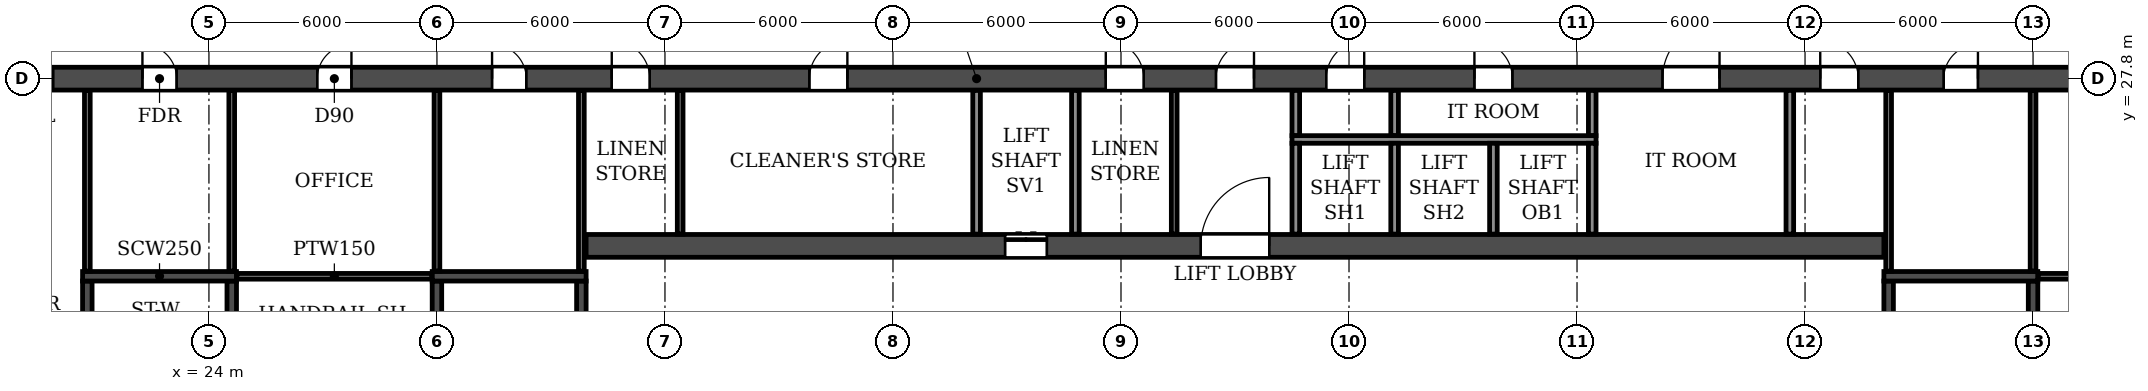
"""IFC4 building model, lengths in metres.
Left out: names, types, materials, properties, quantities, classifications, styles, units other than length and angle.
Written with IfcOpenShell. Run it as: python <this file> out.ifc"""

import sys

from ifc_helpers import new_model, si_unit, direction, frame, frame_2d, origin, place, context, subcontext, project, spatial, rectangle, extrude, element, fill, save


model = new_model("IFC4")
c1 = context("Model", 3, precision=1e-05, world=origin(), true_north=direction((0.0, 1.0)))
c2 = subcontext(c1, "Body", "Model", "MODEL_VIEW")
j1 = project(units=[si_unit("LENGTHUNIT", "METRE"), si_unit("PLANEANGLEUNIT", "RADIAN")], contexts=[c1])
p1 = place(None, origin())
s1 = spatial("IfcSite", under=j1, at=p1, CompositionType="ELEMENT")
p2 = place(p1, origin())
s2 = spatial("IfcBuilding", under=s1, at=p2, CompositionType="ELEMENT")
p3 = place(p2, frame((0.0, 0.0, 53.1)))
s3 = spatial("IfcBuildingStorey", under=s2, at=p3, CompositionType="ELEMENT", Elevation=53.1)
p4 = place(p3, frame((8.6, 27.8, 0.0), z_axis=(0.0, 0.0, 1.0), x_axis=(1.0, 0.0, 0.0)))
e1 = element("IfcWall", 1, at=p4, inside=s3, PredefinedType="SOLIDWALL", context=c2, shape_type="SweptSolid", body=[
    extrude(rectangle(XDim=84.8, YDim=0.6, at=frame_2d((42.4, 0.0))), origin(), (0.0, 0.0, 1.0), 3.05),
])
p5 = place(p4, frame((6.6, 0.0, 0.0)))
e2 = element("IfcOpeningElement", 2, at=p5, cuts=e1, PredefinedType="OPENING", context=c2, shape_type="SweptSolid", body=[
    extrude(rectangle(XDim=0.9, YDim=2.1, at=frame_2d((0.45, 1.05))), frame((0.0, 0.31, 0.0), z_axis=(0.0, -1.0, 0.0), x_axis=(1.0, 0.0, 0.0)), (0.0, 0.0, 1.0), 0.62),
])
p6 = place(p4, frame((10.3, 0.0, 0.0)))
e3 = element("IfcOpeningElement", 3, at=p6, cuts=e1, PredefinedType="OPENING", context=c2, shape_type="SweptSolid", body=[
    extrude(rectangle(XDim=1.0, YDim=2.1, at=frame_2d((0.5, 1.05))), frame((0.0, 0.31, 0.0), z_axis=(0.0, -1.0, 0.0), x_axis=(1.0, 0.0, 0.0)), (0.0, 0.0, 1.0), 0.62),
])
p7 = place(p4, frame((13.65, 0.0, 0.0)))
e4 = element("IfcOpeningElement", 4, at=p7, cuts=e1, PredefinedType="OPENING", context=c2, shape_type="SweptSolid", body=[
    extrude(rectangle(XDim=0.9, YDim=2.1, at=frame_2d((0.45, 1.05))), frame((0.0, 0.31, 0.0), z_axis=(0.0, -1.0, 0.0), x_axis=(1.0, 0.0, 0.0)), (0.0, 0.0, 1.0), 0.62),
])
p8 = place(p4, frame((18.25, 0.0, 0.0)))
e5 = element("IfcOpeningElement", 5, at=p8, cuts=e1, PredefinedType="OPENING", context=c2, shape_type="SweptSolid", body=[
    extrude(rectangle(XDim=0.9, YDim=2.1, at=frame_2d((0.45, 1.05))), frame((0.0, 0.31, 0.0), z_axis=(0.0, -1.0, 0.0), x_axis=(1.0, 0.0, 0.0)), (0.0, 0.0, 1.0), 0.62),
])
p9 = place(p4, frame((22.85, 0.0, 0.0)))
e6 = element("IfcOpeningElement", 6, at=p9, cuts=e1, PredefinedType="OPENING", context=c2, shape_type="SweptSolid", body=[
    extrude(rectangle(XDim=0.9, YDim=2.1, at=frame_2d((0.45, 1.05))), frame((0.0, 0.31, 0.0), z_axis=(0.0, -1.0, 0.0), x_axis=(1.0, 0.0, 0.0)), (0.0, 0.0, 1.0), 0.62),
])
p10 = place(p4, frame((26.0, 0.0, 0.0)))
e7 = element("IfcOpeningElement", 7, at=p10, cuts=e1, PredefinedType="OPENING", context=c2, shape_type="SweptSolid", body=[
    extrude(rectangle(XDim=1.0, YDim=2.1, at=frame_2d((0.5, 1.05))), frame((0.0, 0.31, 0.0), z_axis=(0.0, -1.0, 0.0), x_axis=(1.0, 0.0, 0.0)), (0.0, 0.0, 1.0), 0.62),
])
p11 = place(p4, frame((31.2, 0.0, 0.0)))
e8 = element("IfcOpeningElement", 8, at=p11, cuts=e1, PredefinedType="OPENING", context=c2, shape_type="SweptSolid", body=[
    extrude(rectangle(XDim=1.0, YDim=2.1, at=frame_2d((0.5, 1.05))), frame((0.0, 0.31, 0.0), z_axis=(0.0, -1.0, 0.0), x_axis=(1.0, 0.0, 0.0)), (0.0, 0.0, 1.0), 0.62),
])
p12 = place(p4, frame((39.0, 0.0, 0.0)))
e9 = element("IfcOpeningElement", 9, at=p12, cuts=e1, PredefinedType="OPENING", context=c2, shape_type="SweptSolid", body=[
    extrude(rectangle(XDim=1.0, YDim=2.1, at=frame_2d((0.5, 1.05))), frame((0.0, 0.31, 0.0), z_axis=(0.0, -1.0, 0.0), x_axis=(1.0, 0.0, 0.0)), (0.0, 0.0, 1.0), 0.62),
])
p13 = place(p4, frame((41.9, 0.0, 0.0)))
e10 = element("IfcOpeningElement", 10, at=p13, cuts=e1, PredefinedType="OPENING", context=c2, shape_type="SweptSolid", body=[
    extrude(rectangle(XDim=1.0, YDim=2.1, at=frame_2d((0.5, 1.05))), frame((0.0, 0.31, 0.0), z_axis=(0.0, -1.0, 0.0), x_axis=(1.0, 0.0, 0.0)), (0.0, 0.0, 1.0), 0.62),
])
p14 = place(p4, frame((44.8, 0.0, 0.0)))
e11 = element("IfcOpeningElement", 11, at=p14, cuts=e1, PredefinedType="OPENING", context=c2, shape_type="SweptSolid", body=[
    extrude(rectangle(XDim=1.0, YDim=2.1, at=frame_2d((0.5, 1.05))), frame((0.0, 0.31, 0.0), z_axis=(0.0, -1.0, 0.0), x_axis=(1.0, 0.0, 0.0)), (0.0, 0.0, 1.0), 0.62),
])
p15 = place(p4, frame((48.7, 0.0, 0.0)))
e12 = element("IfcOpeningElement", 12, at=p15, cuts=e1, PredefinedType="OPENING", context=c2, shape_type="SweptSolid", body=[
    extrude(rectangle(XDim=1.0, YDim=2.1, at=frame_2d((0.5, 1.05))), frame((0.0, 0.31, 0.0), z_axis=(0.0, -1.0, 0.0), x_axis=(1.0, 0.0, 0.0)), (0.0, 0.0, 1.0), 0.62),
])
p16 = place(p4, frame((53.65, 0.0, 0.0)))
e13 = element("IfcOpeningElement", 13, at=p16, cuts=e1, PredefinedType="OPENING", context=c2, shape_type="SweptSolid", body=[
    extrude(rectangle(XDim=1.5, YDim=2.1, at=frame_2d((0.75, 1.05))), frame((0.0, 0.31, 0.0), z_axis=(0.0, -1.0, 0.0), x_axis=(1.0, 0.0, 0.0)), (0.0, 0.0, 1.0), 0.62),
])
p17 = place(p4, frame((57.8, 0.0, 0.0)))
e14 = element("IfcOpeningElement", 14, at=p17, cuts=e1, PredefinedType="OPENING", context=c2, shape_type="SweptSolid", body=[
    extrude(rectangle(XDim=1.0, YDim=2.1, at=frame_2d((0.5, 1.05))), frame((0.0, 0.31, 0.0), z_axis=(0.0, -1.0, 0.0), x_axis=(1.0, 0.0, 0.0)), (0.0, 0.0, 1.0), 0.62),
])
p18 = place(p4, frame((61.05, 0.0, 0.0)))
e15 = element("IfcOpeningElement", 15, at=p18, cuts=e1, PredefinedType="OPENING", context=c2, shape_type="SweptSolid", body=[
    extrude(rectangle(XDim=0.9, YDim=2.1, at=frame_2d((0.45, 1.05))), frame((0.0, 0.31, 0.0), z_axis=(0.0, -1.0, 0.0), x_axis=(1.0, 0.0, 0.0)), (0.0, 0.0, 1.0), 0.62),
])
p19 = place(p4, frame((65.65, 0.0, 0.0)))
e16 = element("IfcOpeningElement", 16, at=p19, cuts=e1, PredefinedType="OPENING", context=c2, shape_type="SweptSolid", body=[
    extrude(rectangle(XDim=0.9, YDim=2.1, at=frame_2d((0.45, 1.05))), frame((0.0, 0.31, 0.0), z_axis=(0.0, -1.0, 0.0), x_axis=(1.0, 0.0, 0.0)), (0.0, 0.0, 1.0), 0.62),
])
p20 = place(p4, frame((70.25, 0.0, 0.0)))
e17 = element("IfcOpeningElement", 17, at=p20, cuts=e1, PredefinedType="OPENING", context=c2, shape_type="SweptSolid", body=[
    extrude(rectangle(XDim=0.9, YDim=2.1, at=frame_2d((0.45, 1.05))), frame((0.0, 0.31, 0.0), z_axis=(0.0, -1.0, 0.0), x_axis=(1.0, 0.0, 0.0)), (0.0, 0.0, 1.0), 0.62),
])
p21 = place(p4, frame((73.5, 0.0, 0.0)))
e18 = element("IfcOpeningElement", 18, at=p21, cuts=e1, PredefinedType="OPENING", context=c2, shape_type="SweptSolid", body=[
    extrude(rectangle(XDim=1.0, YDim=2.1, at=frame_2d((0.5, 1.05))), frame((0.0, 0.31, 0.0), z_axis=(0.0, -1.0, 0.0), x_axis=(1.0, 0.0, 0.0)), (0.0, 0.0, 1.0), 0.62),
])
p22 = place(p4, frame((77.3, 0.0, 0.0)))
e19 = element("IfcOpeningElement", 19, at=p22, cuts=e1, PredefinedType="OPENING", context=c2, shape_type="SweptSolid", body=[
    extrude(rectangle(XDim=0.9, YDim=2.1, at=frame_2d((0.45, 1.05))), frame((0.0, 0.31, 0.0), z_axis=(0.0, -1.0, 0.0), x_axis=(1.0, 0.0, 0.0)), (0.0, 0.0, 1.0), 0.62),
])
p23 = place(p3, frame((33.925, 23.4, 0.0), z_axis=(0.0, 0.0, 1.0), x_axis=(1.0, 0.0, 0.0)))
e20 = element("IfcWall", 20, at=p23, inside=s3, PredefinedType="SOLIDWALL", context=c2, shape_type="SweptSolid", body=[
    extrude(rectangle(XDim=34.15, YDim=0.6, at=frame_2d((17.075, 0.0))), origin(), (0.0, 0.0, 1.0), 3.05),
])
p24 = place(p23, frame((16.175, 0.0, 0.0)))
e21 = element("IfcOpeningElement", 21, at=p24, cuts=e20, PredefinedType="OPENING", context=c2, shape_type="SweptSolid", body=[
    extrude(rectangle(XDim=1.8, YDim=2.1, at=frame_2d((0.9, 1.05))), frame((0.0, 0.31, 0.0), z_axis=(0.0, -1.0, 0.0), x_axis=(1.0, 0.0, 0.0)), (0.0, 0.0, 1.0), 0.62),
])
p25 = place(p23, frame((11.025, 0.0, 0.0)))
e22 = element("IfcOpeningElement", 22, at=p25, cuts=e20, PredefinedType="OPENING", context=c2, shape_type="SweptSolid", body=[
    extrude(rectangle(XDim=1.1, YDim=2.1, at=frame_2d((0.55, 1.05))), frame((0.0, 0.31, 0.0), z_axis=(0.0, -1.0, 0.0), x_axis=(1.0, 0.0, 0.0)), (0.0, 0.0, 1.0), 0.62),
])
p26 = place(p3, frame((30.0, 14.9, 0.0), z_axis=(0.0, 0.0, 1.0), x_axis=(0.0, 1.0, 0.0)))
e23 = element("IfcWall", 23, at=p26, inside=s3, PredefinedType="SOLIDWALL", context=c2, shape_type="SweptSolid", body=[
    extrude(rectangle(XDim=7.575, YDim=0.25, at=frame_2d((3.788, 0.0))), origin(), (0.0, 0.0, 1.0), 3.05),
])
p27 = place(p3, frame((33.8, 14.9, 0.0), z_axis=(0.0, 0.0, 1.0), x_axis=(0.0, 1.0, 0.0)))
e24 = element("IfcWall", 24, at=p27, inside=s3, PredefinedType="SOLIDWALL", context=c2, shape_type="SweptSolid", body=[
    extrude(rectangle(XDim=7.575, YDim=0.25, at=frame_2d((3.788, 0.0))), origin(), (0.0, 0.0, 1.0), 3.05),
])
p28 = place(p27, frame((0.4, 0.0, 0.0)))
e25 = element("IfcOpeningElement", 25, at=p28, cuts=e24, PredefinedType="OPENING", context=c2, shape_type="SweptSolid", body=[
    extrude(rectangle(XDim=1.0, YDim=2.1, at=frame_2d((0.5, 1.05))), frame((0.0, 0.135, 0.0), z_axis=(0.0, -1.0, 0.0), x_axis=(1.0, 0.0, 0.0)), (0.0, 0.0, 1.0), 0.27),
])
p29 = place(p3, frame((29.875, 22.6, 0.0), z_axis=(0.0, 0.0, 1.0), x_axis=(1.0, 0.0, 0.0)))
e26 = element("IfcWall", 26, at=p29, inside=s3, PredefinedType="SOLIDWALL", context=c2, shape_type="SweptSolid", body=[
    extrude(rectangle(XDim=4.05, YDim=0.25, at=frame_2d((2.025, 0.0))), origin(), (0.0, 0.0, 1.0), 3.05),
])
p30 = place(p3, frame((68.2, 14.9, 0.0), z_axis=(0.0, 0.0, 1.0), x_axis=(0.0, 1.0, 0.0)))
e27 = element("IfcWall", 27, at=p30, inside=s3, PredefinedType="SOLIDWALL", context=c2, shape_type="SweptSolid", body=[
    extrude(rectangle(XDim=7.575, YDim=0.25, at=frame_2d((3.788, 0.0))), origin(), (0.0, 0.0, 1.0), 3.05),
])
p31 = place(p30, frame((0.4, 0.0, 0.0)))
e28 = element("IfcOpeningElement", 28, at=p31, cuts=e27, PredefinedType="OPENING", context=c2, shape_type="SweptSolid", body=[
    extrude(rectangle(XDim=1.0, YDim=2.1, at=frame_2d((0.5, 1.05))), frame((0.0, 0.135, 0.0), z_axis=(0.0, -1.0, 0.0), x_axis=(1.0, 0.0, 0.0)), (0.0, 0.0, 1.0), 0.27),
])
p32 = place(p3, frame((72.0, 14.9, 0.0), z_axis=(0.0, 0.0, 1.0), x_axis=(0.0, 1.0, 0.0)))
e29 = element("IfcWall", 29, at=p32, inside=s3, PredefinedType="SOLIDWALL", context=c2, shape_type="SweptSolid", body=[
    extrude(rectangle(XDim=7.575, YDim=0.25, at=frame_2d((3.788, 0.0))), origin(), (0.0, 0.0, 1.0), 3.05),
])
p33 = place(p3, frame((68.075, 22.6, 0.0), z_axis=(0.0, 0.0, 1.0), x_axis=(1.0, 0.0, 0.0)))
e30 = element("IfcWall", 30, at=p33, inside=s3, PredefinedType="SOLIDWALL", context=c2, shape_type="SweptSolid", body=[
    extrude(rectangle(XDim=4.05, YDim=0.25, at=frame_2d((2.025, 0.0))), origin(), (0.0, 0.0, 1.0), 3.05),
])
p34 = place(p3, frame((20.8, 14.9, 0.0), z_axis=(0.0, 0.0, 1.0), x_axis=(0.0, 1.0, 0.0)))
e31 = element("IfcWall", 31, at=p34, inside=s3, PredefinedType="SOLIDWALL", context=c2, shape_type="SweptSolid", body=[
    extrude(rectangle(XDim=7.575, YDim=0.25, at=frame_2d((3.788, 0.0))), origin(), (0.0, 0.0, 1.0), 3.05),
])
p35 = place(p34, frame((0.4, 0.0, 0.0)))
e32 = element("IfcOpeningElement", 32, at=p35, cuts=e31, PredefinedType="OPENING", context=c2, shape_type="SweptSolid", body=[
    extrude(rectangle(XDim=1.0, YDim=2.1, at=frame_2d((0.5, 1.05))), frame((0.0, 0.135, 0.0), z_axis=(0.0, -1.0, 0.0), x_axis=(1.0, 0.0, 0.0)), (0.0, 0.0, 1.0), 0.27),
])
p36 = place(p3, frame((24.6, 14.9, 0.0), z_axis=(0.0, 0.0, 1.0), x_axis=(0.0, 1.0, 0.0)))
e33 = element("IfcWall", 33, at=p36, inside=s3, PredefinedType="SOLIDWALL", context=c2, shape_type="SweptSolid", body=[
    extrude(rectangle(XDim=7.575, YDim=0.25, at=frame_2d((3.788, 0.0))), origin(), (0.0, 0.0, 1.0), 3.05),
])
p37 = place(p3, frame((20.675, 22.6, 0.0), z_axis=(0.0, 0.0, 1.0), x_axis=(1.0, 0.0, 0.0)))
e34 = element("IfcWall", 34, at=p37, inside=s3, PredefinedType="SOLIDWALL", context=c2, shape_type="SweptSolid", body=[
    extrude(rectangle(XDim=4.05, YDim=0.25, at=frame_2d((2.025, 0.0))), origin(), (0.0, 0.0, 1.0), 3.05),
])
p38 = place(p3, frame((49.4, 23.71, 0.0), z_axis=(0.0, 0.0, 1.0), x_axis=(0.0, 1.0, 0.0)))
e35 = element("IfcWall", 35, at=p38, inside=s3, PredefinedType="PARTITIONING", context=c2, shape_type="SweptSolid", body=[
    extrude(rectangle(XDim=3.78, YDim=0.15, at=frame_2d((1.89, 0.0))), origin(), (0.0, 0.0, 1.0), 3.05),
])
for number, where, z_axis, x_axis in (
    (36, (24.735, 22.6, 0.0), (0.0, 0.0, 1.0), (1.0, 0.0, 0.0)),
    (37, (72.135, 22.6, 0.0), (0.0, 0.0, 1.0), (1.0, 0.0, 0.0)),
):
    element("IfcWall", number, at=place(p3, frame(where, z_axis=z_axis, x_axis=x_axis)), inside=s3, PredefinedType="PARTITIONING", context=c2, shape_type="SweptSolid", body=[
        extrude(rectangle(XDim=5.13, YDim=0.15, at=frame_2d((2.565, 0.0))), origin(), (0.0, 0.0, 1.0), 3.05),
    ])
p39 = place(p3, frame((36.4, 23.71, 0.0), z_axis=(0.0, 0.0, 1.0), x_axis=(0.0, 1.0, 0.0)))
e38 = element("IfcWall", 38, at=p39, inside=s3, PredefinedType="PARTITIONING", context=c2, shape_type="SweptSolid", body=[
    extrude(rectangle(XDim=3.78, YDim=0.15, at=frame_2d((1.89, 0.0))), origin(), (0.0, 0.0, 1.0), 3.05),
])
for number, where, z_axis, x_axis in (
    (39, (52.6, 26.3, 0.0), (0.0, 0.0, 1.0), (0.0, 1.0, 0.0)),
    (40, (55.2, 26.3, 0.0), (0.0, 0.0, 1.0), (0.0, 1.0, 0.0)),
    (41, (60.4, 26.3, 0.0), (0.0, 0.0, 1.0), (0.0, 1.0, 0.0)),
):
    element("IfcWall", number, at=place(p3, frame(where, z_axis=z_axis, x_axis=x_axis)), inside=s3, PredefinedType="PARTITIONING", context=c2, shape_type="SweptSolid", body=[
        extrude(rectangle(XDim=1.19, YDim=0.2, at=frame_2d((0.595, 0.0))), origin(), (0.0, 0.0, 1.0), 3.05),
    ])
p40 = place(p3, frame((65.6, 23.71, 0.0), z_axis=(0.0, 0.0, 1.0), x_axis=(0.0, 1.0, 0.0)))
e42 = element("IfcWall", 42, at=p40, inside=s3, PredefinedType="PARTITIONING", context=c2, shape_type="SweptSolid", body=[
    extrude(rectangle(XDim=3.78, YDim=0.2, at=frame_2d((1.89, 0.0))), origin(), (0.0, 0.0, 1.0), 3.05),
])
for number, where, z_axis, x_axis in (
    (43, (20.8, 22.735, 0.0), (0.0, 0.0, 1.0), (0.0, 1.0, 0.0)),
    (44, (24.6, 22.735, 0.0), (0.0, 0.0, 1.0), (0.0, 1.0, 0.0)),
    (45, (30.0, 22.735, 0.0), (0.0, 0.0, 1.0), (0.0, 1.0, 0.0)),
    (46, (33.8, 22.735, 0.0), (0.0, 0.0, 1.0), (0.0, 1.0, 0.0)),
    (47, (68.2, 22.735, 0.0), (0.0, 0.0, 1.0), (0.0, 1.0, 0.0)),
    (48, (72.0, 22.735, 0.0), (0.0, 0.0, 1.0), (0.0, 1.0, 0.0)),
):
    element("IfcWall", number, at=place(p3, frame(where, z_axis=z_axis, x_axis=x_axis)), inside=s3, PredefinedType="PARTITIONING", context=c2, shape_type="SweptSolid", body=[
        extrude(rectangle(XDim=4.755, YDim=0.15, at=frame_2d((2.377, 0.0))), origin(), (0.0, 0.0, 1.0), 3.05),
    ])
p41 = place(p3, frame((52.5, 26.2, 0.0), z_axis=(0.0, 0.0, 1.0), x_axis=(1.0, 0.0, 0.0)))
e49 = element("IfcWall", 49, at=p41, inside=s3, PredefinedType="PARTITIONING", context=c2, shape_type="SweptSolid", body=[
    extrude(rectangle(XDim=8.0, YDim=0.2, at=frame_2d((4.0, 0.0))), origin(), (0.0, 0.0, 1.0), 3.05),
])
for number, where, z_axis, x_axis in (
    (50, (44.2, 23.71, 0.0), (0.0, 0.0, 1.0), (0.0, 1.0, 0.0)),
    (51, (46.8, 23.71, 0.0), (0.0, 0.0, 1.0), (0.0, 1.0, 0.0)),
):
    element("IfcWall", number, at=place(p3, frame(where, z_axis=z_axis, x_axis=x_axis)), inside=s3, PredefinedType="PARTITIONING", context=c2, shape_type="SweptSolid", body=[
        extrude(rectangle(XDim=3.78, YDim=0.2, at=frame_2d((1.89, 0.0))), origin(), (0.0, 0.0, 1.0), 3.05),
    ])
for number, where, z_axis, x_axis in (
    (52, (52.6, 23.71, 0.0), (0.0, 0.0, 1.0), (0.0, 1.0, 0.0)),
    (53, (55.2, 23.71, 0.0), (0.0, 0.0, 1.0), (0.0, 1.0, 0.0)),
    (54, (57.8, 23.71, 0.0), (0.0, 0.0, 1.0), (0.0, 1.0, 0.0)),
    (55, (60.4, 23.71, 0.0), (0.0, 0.0, 1.0), (0.0, 1.0, 0.0)),
):
    element("IfcWall", number, at=place(p3, frame(where, z_axis=z_axis, x_axis=x_axis)), inside=s3, PredefinedType="PARTITIONING", context=c2, shape_type="SweptSolid", body=[
        extrude(rectangle(XDim=2.39, YDim=0.2, at=frame_2d((1.195, 0.0))), origin(), (0.0, 0.0, 1.0), 3.05),
    ])
p42 = place(p6, origin())
e56 = element("IfcDoor", 56, at=p42, inside=s3, OperationType="SINGLE_SWING_LEFT", PredefinedType="DOOR", context=c2, shape_type="SweptSolid", body=[
    extrude(rectangle(XDim=1.0, YDim=2.1, at=frame_2d((0.5, 1.05))), frame((0.0, 0.025, 0.0), z_axis=(0.0, -1.0, 0.0), x_axis=(1.0, 0.0, 0.0)), (0.0, 0.0, 1.0), 0.05),
])
fill(e3, e56)
p43 = place(p7, origin())
e57 = element("IfcDoor", 57, at=p43, inside=s3, OperationType="SINGLE_SWING_LEFT", PredefinedType="DOOR", context=c2, shape_type="SweptSolid", body=[
    extrude(rectangle(XDim=0.9, YDim=2.1, at=frame_2d((0.45, 1.05))), frame((0.0, 0.025, 0.0), z_axis=(0.0, -1.0, 0.0), x_axis=(1.0, 0.0, 0.0)), (0.0, 0.0, 1.0), 0.05),
])
fill(e4, e57)
p44 = place(p8, origin())
e58 = element("IfcDoor", 58, at=p44, inside=s3, OperationType="SINGLE_SWING_RIGHT", PredefinedType="DOOR", context=c2, shape_type="SweptSolid", body=[
    extrude(rectangle(XDim=0.9, YDim=2.1, at=frame_2d((0.45, 1.05))), frame((0.0, 0.025, 0.0), z_axis=(0.0, -1.0, 0.0), x_axis=(1.0, 0.0, 0.0)), (0.0, 0.0, 1.0), 0.05),
])
fill(e5, e58)
p45 = place(p9, origin())
e59 = element("IfcDoor", 59, at=p45, inside=s3, OperationType="SINGLE_SWING_LEFT", PredefinedType="DOOR", context=c2, shape_type="SweptSolid", body=[
    extrude(rectangle(XDim=0.9, YDim=2.1, at=frame_2d((0.45, 1.05))), frame((0.0, 0.025, 0.0), z_axis=(0.0, -1.0, 0.0), x_axis=(1.0, 0.0, 0.0)), (0.0, 0.0, 1.0), 0.05),
])
fill(e6, e59)
p46 = place(p10, origin())
e60 = element("IfcDoor", 60, at=p46, inside=s3, OperationType="SINGLE_SWING_LEFT", PredefinedType="DOOR", context=c2, shape_type="SweptSolid", body=[
    extrude(rectangle(XDim=1.0, YDim=2.1, at=frame_2d((0.5, 1.05))), frame((0.0, 0.025, 0.0), z_axis=(0.0, -1.0, 0.0), x_axis=(1.0, 0.0, 0.0)), (0.0, 0.0, 1.0), 0.05),
])
fill(e7, e60)
p47 = place(p11, origin())
e61 = element("IfcDoor", 61, at=p47, inside=s3, OperationType="SINGLE_SWING_RIGHT", PredefinedType="DOOR", context=c2, shape_type="SweptSolid", body=[
    extrude(rectangle(XDim=1.0, YDim=2.1, at=frame_2d((0.5, 1.05))), frame((0.0, 0.025, 0.0), z_axis=(0.0, -1.0, 0.0), x_axis=(1.0, 0.0, 0.0)), (0.0, 0.0, 1.0), 0.05),
])
fill(e8, e61)
p48 = place(p12, origin())
e62 = element("IfcDoor", 62, at=p48, inside=s3, OperationType="SINGLE_SWING_LEFT", PredefinedType="DOOR", context=c2, shape_type="SweptSolid", body=[
    extrude(rectangle(XDim=1.0, YDim=2.1, at=frame_2d((0.5, 1.05))), frame((0.0, 0.025, 0.0), z_axis=(0.0, -1.0, 0.0), x_axis=(1.0, 0.0, 0.0)), (0.0, 0.0, 1.0), 0.05),
])
fill(e9, e62)
p49 = place(p13, origin())
e63 = element("IfcDoor", 63, at=p49, inside=s3, OperationType="SINGLE_SWING_RIGHT", PredefinedType="DOOR", context=c2, shape_type="SweptSolid", body=[
    extrude(rectangle(XDim=1.0, YDim=2.1, at=frame_2d((0.5, 1.05))), frame((0.0, 0.025, 0.0), z_axis=(0.0, -1.0, 0.0), x_axis=(1.0, 0.0, 0.0)), (0.0, 0.0, 1.0), 0.05),
])
fill(e10, e63)
p50 = place(p14, origin())
e64 = element("IfcDoor", 64, at=p50, inside=s3, OperationType="SINGLE_SWING_RIGHT", PredefinedType="DOOR", context=c2, shape_type="SweptSolid", body=[
    extrude(rectangle(XDim=1.0, YDim=2.1, at=frame_2d((0.5, 1.05))), frame((0.0, 0.025, 0.0), z_axis=(0.0, -1.0, 0.0), x_axis=(1.0, 0.0, 0.0)), (0.0, 0.0, 1.0), 0.05),
])
fill(e11, e64)
p51 = place(p15, origin())
e65 = element("IfcDoor", 65, at=p51, inside=s3, OperationType="SINGLE_SWING_LEFT", PredefinedType="DOOR", context=c2, shape_type="SweptSolid", body=[
    extrude(rectangle(XDim=1.0, YDim=2.1, at=frame_2d((0.5, 1.05))), frame((0.0, 0.025, 0.0), z_axis=(0.0, -1.0, 0.0), x_axis=(1.0, 0.0, 0.0)), (0.0, 0.0, 1.0), 0.05),
])
fill(e12, e65)
p52 = place(p16, origin())
e66 = element("IfcDoor", 66, at=p52, inside=s3, OperationType="DOUBLE_DOOR_SINGLE_SWING", PredefinedType="DOOR", context=c2, shape_type="SweptSolid", body=[
    extrude(rectangle(XDim=1.5, YDim=2.1, at=frame_2d((0.75, 1.05))), frame((0.0, 0.025, 0.0), z_axis=(0.0, -1.0, 0.0), x_axis=(1.0, 0.0, 0.0)), (0.0, 0.0, 1.0), 0.05),
])
fill(e13, e66)
p53 = place(p17, origin())
e67 = element("IfcDoor", 67, at=p53, inside=s3, OperationType="SINGLE_SWING_LEFT", PredefinedType="DOOR", context=c2, shape_type="SweptSolid", body=[
    extrude(rectangle(XDim=1.0, YDim=2.1, at=frame_2d((0.5, 1.05))), frame((0.0, 0.025, 0.0), z_axis=(0.0, -1.0, 0.0), x_axis=(1.0, 0.0, 0.0)), (0.0, 0.0, 1.0), 0.05),
])
fill(e14, e67)
p54 = place(p18, origin())
e68 = element("IfcDoor", 68, at=p54, inside=s3, OperationType="SINGLE_SWING_RIGHT", PredefinedType="DOOR", context=c2, shape_type="SweptSolid", body=[
    extrude(rectangle(XDim=0.9, YDim=2.1, at=frame_2d((0.45, 1.05))), frame((0.0, 0.025, 0.0), z_axis=(0.0, -1.0, 0.0), x_axis=(1.0, 0.0, 0.0)), (0.0, 0.0, 1.0), 0.05),
])
fill(e15, e68)
p55 = place(p24, origin())
e69 = element("IfcDoor", 69, at=p55, inside=s3, OperationType="DOUBLE_DOOR_SINGLE_SWING", PredefinedType="DOOR", context=c2, shape_type="SweptSolid", body=[
    extrude(rectangle(XDim=1.8, YDim=2.1, at=frame_2d((0.9, 1.05))), frame((0.0, 0.025, 0.0), z_axis=(0.0, -1.0, 0.0), x_axis=(1.0, 0.0, 0.0)), (0.0, 0.0, 1.0), 0.05),
])
fill(e21, e69)
p56 = place(p25, origin())
e70 = element("IfcDoor", 70, at=p56, inside=s3, OperationType="DOUBLE_DOOR_SLIDING", PredefinedType="DOOR", context=c2, shape_type="SweptSolid", body=[
    extrude(rectangle(XDim=1.1, YDim=2.1, at=frame_2d((0.55, 1.05))), frame((0.0, 0.025, 0.0), z_axis=(0.0, -1.0, 0.0), x_axis=(1.0, 0.0, 0.0)), (0.0, 0.0, 1.0), 0.05),
])
fill(e22, e70)
save(model, sys.argv[1])
